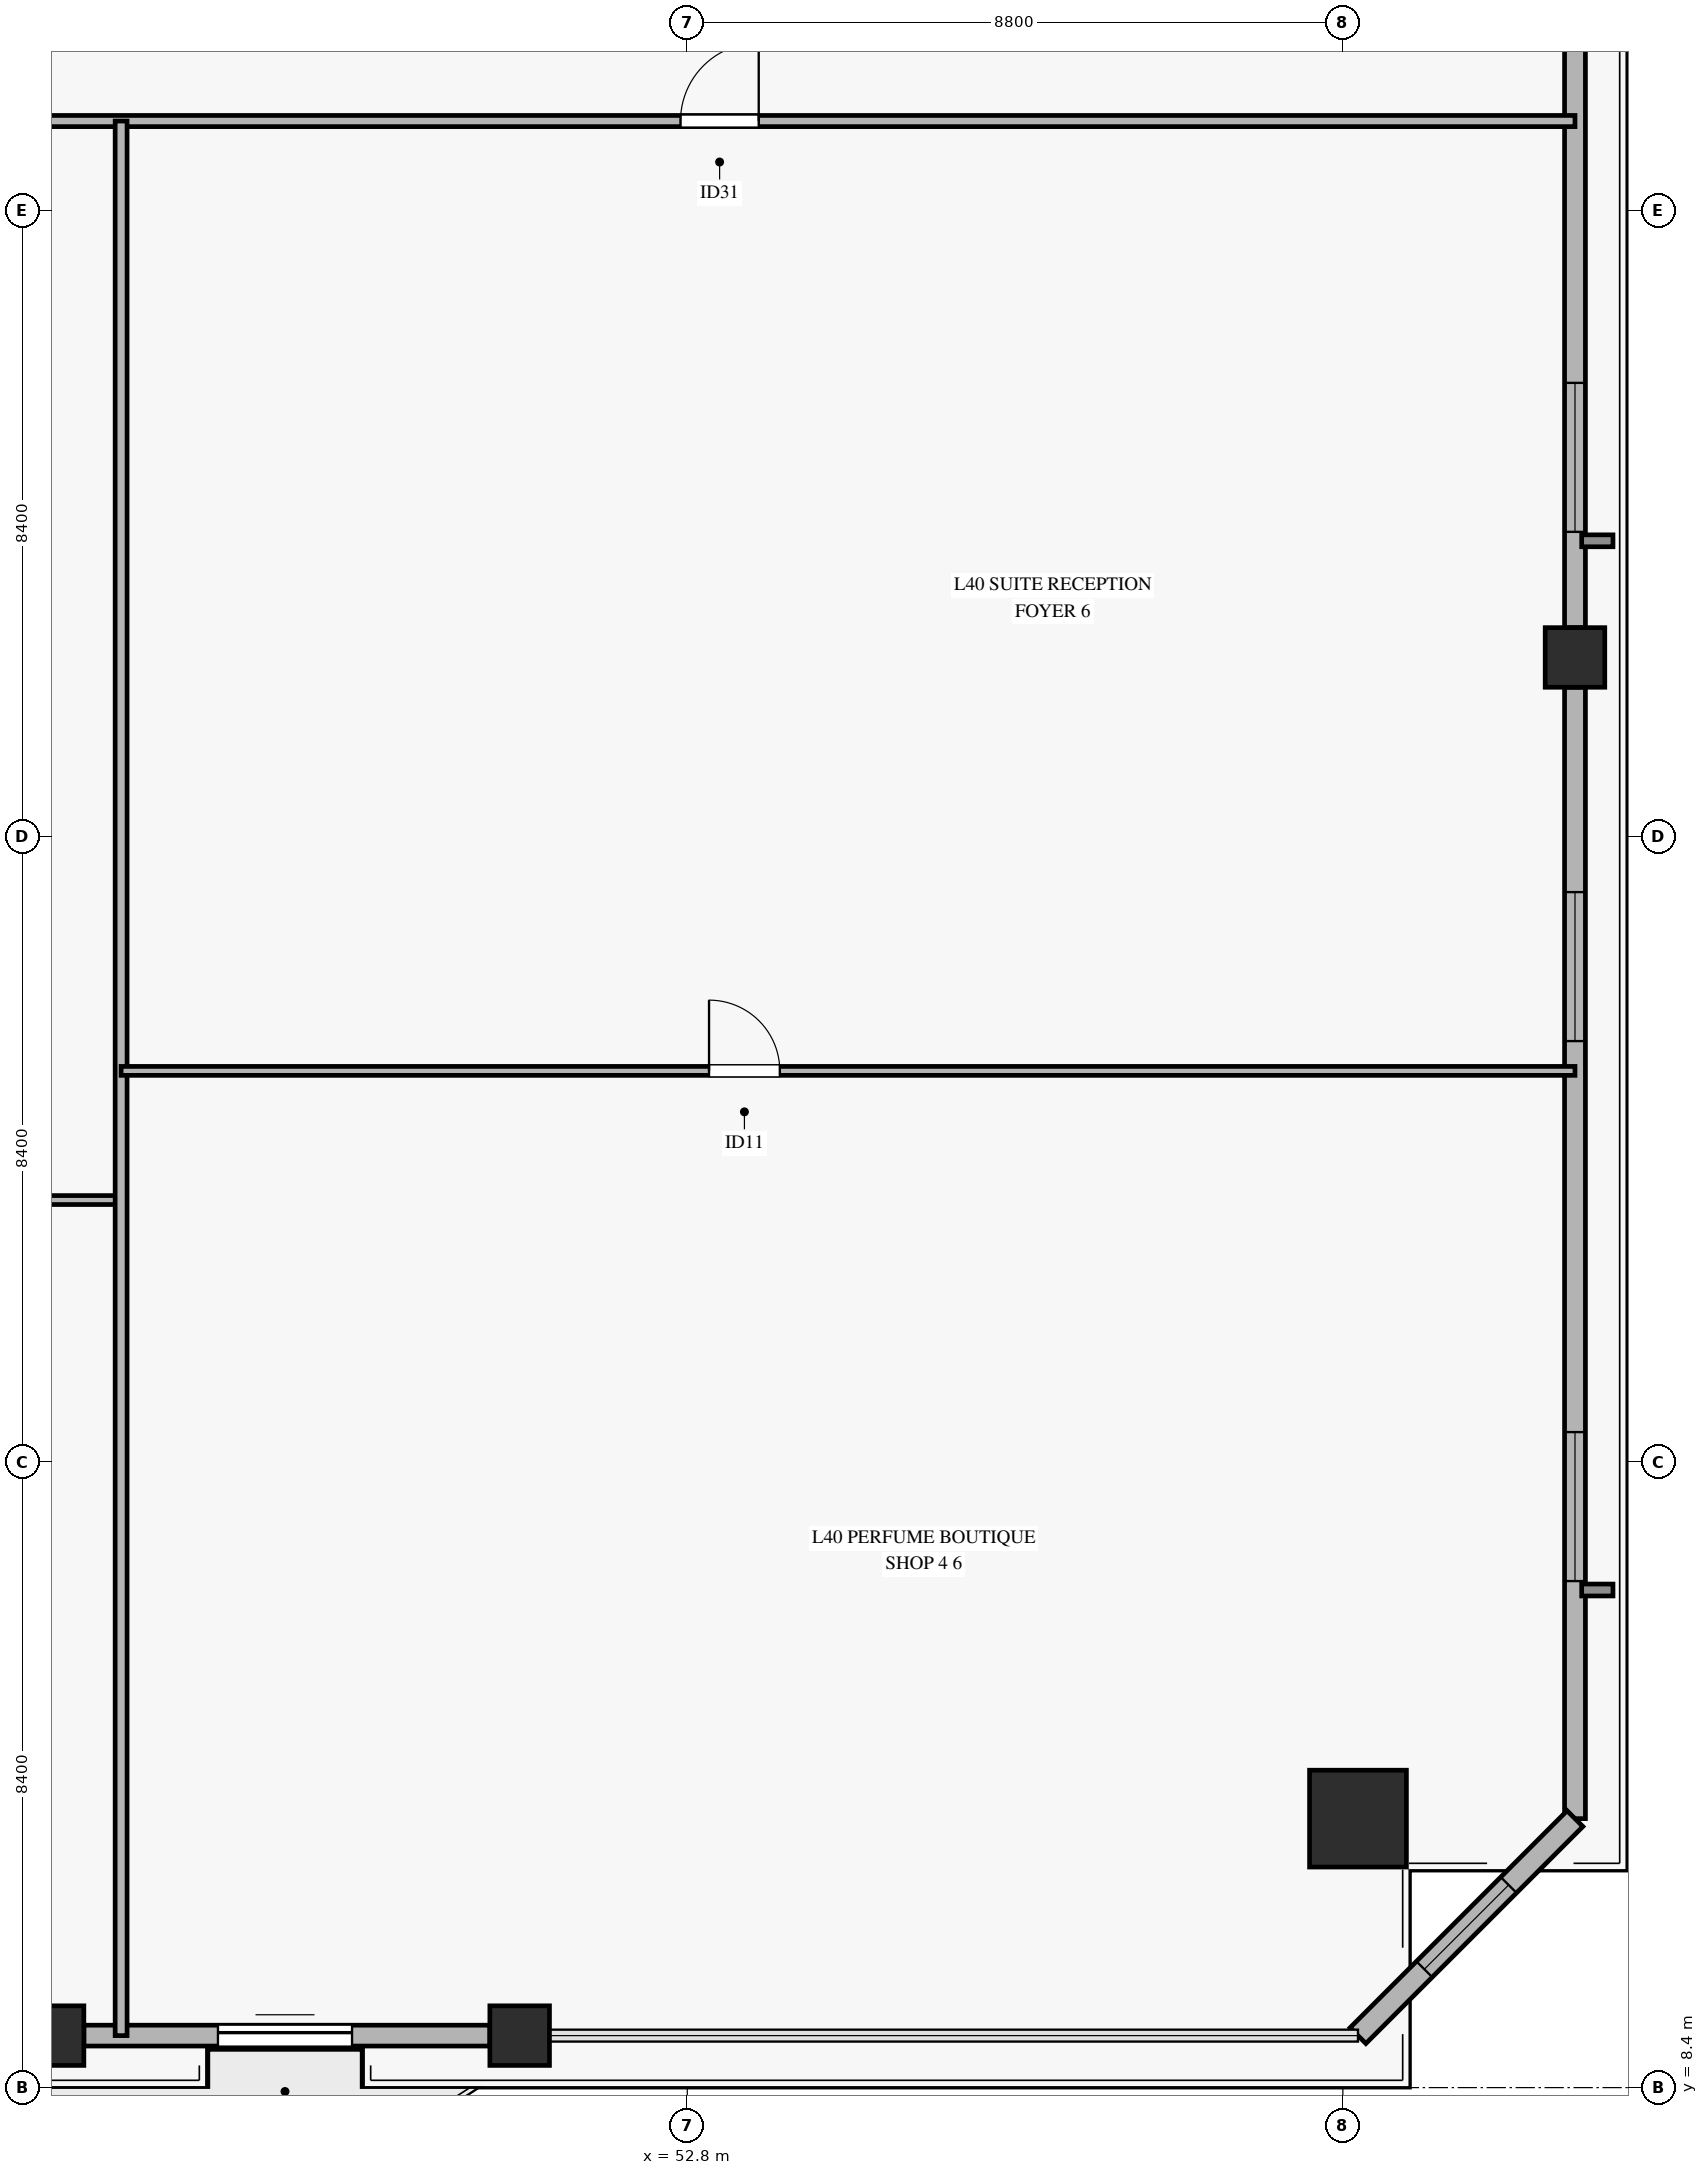
"""IFC4 building model, lengths in metres.
Left out: names, types, materials, properties, quantities, classifications, styles, units other than length and angle.
Written with IfcOpenShell. Run it as: python <this file> out.ifc"""

import sys

from ifc_helpers import new_model, si_unit, direction, frame, frame_2d, origin, origin_2d, place, context, subcontext, project, spatial, rectangle, hollow_rectangle, extrude, source, transform, mapped, element, fill, save


model = new_model("IFC4")
c1 = context("Model", 3, precision=1e-05, world=origin(), true_north=direction((0.0, 1.0)))
c2 = subcontext(c1, "Body", "Model", "MODEL_VIEW")
j1 = project(units=[si_unit("LENGTHUNIT", "METRE"), si_unit("PLANEANGLEUNIT", "RADIAN")], contexts=[c1])
p1 = place(None, origin())
s1 = spatial("IfcSite", under=j1, at=p1, CompositionType="ELEMENT")
p2 = place(p1, origin())
s2 = spatial("IfcBuilding", under=s1, at=p2, CompositionType="ELEMENT")
p3 = place(p2, frame((0.0, 0.0, 163.2)))
s3 = spatial("IfcBuildingStorey", under=s2, at=p3, CompositionType="ELEMENT", Elevation=163.2)
m1 = source(origin(), c2, "Body", "SweptSolid", [
    extrude(hollow_rectangle(XDim=1.3, YDim=1.3, WallThickness=0.06, at=origin_2d()), origin(), (0.0, 0.0, 1.0), 3.27),
])
p4 = place(p3, frame((61.803, 12.011, 0.0), z_axis=(0.0, 0.0, 1.0), x_axis=(1.0, 0.0, 0.0)))
e1 = element("IfcColumn", 1, at=p4, inside=s3, PredefinedType="COLUMN", context=c2, shape_type="MappedRepresentation", body=[
    mapped(m1, transform((0.0, 0.0, 0.0), x_axis=(1.0, 0.0, 0.0), y_axis=(0.0, 1.0, 0.0), z_axis=(0.0, 0.0, 1.0), scale=1.0)),
])
m2 = source(origin(), c2, "Body", "SweptSolid", [
    extrude(hollow_rectangle(XDim=0.8, YDim=0.8, WallThickness=0.036, at=origin_2d()), origin(), (0.0, 0.0, 1.0), 3.27),
])
for number, where, z_axis, x_axis in (
    (2, (44.3, 9.098, 0.0), (0.0, 0.0, 1.0), (1.0, 0.0, 0.0)),
    (3, (50.55, 9.098, 0.0), (0.0, 0.0, 1.0), (1.0, 0.0, 0.0)),
    (4, (64.716, 27.599, 0.0), (0.0, 0.0, 1.0), (1.0, 0.0, 0.0)),
):
    element("IfcColumn", number, at=place(p3, frame(where, z_axis=z_axis, x_axis=x_axis)), inside=s3, PredefinedType="COLUMN", context=c2, shape_type="MappedRepresentation", body=[
        mapped(m2, transform((0.0, 0.0, 0.0), x_axis=(1.0, 0.0, 0.0), y_axis=(0.0, 1.0, 0.0), z_axis=(0.0, 0.0, 1.0), scale=1.0)),
    ])
p5 = place(p3, frame((44.7, 9.098, 0.0), z_axis=(0.0, 0.0, 1.0), x_axis=(1.0, 0.0, 0.0)))
e5 = element("IfcWall", 5, at=p5, inside=s3, PredefinedType="SOLIDWALL", context=c2, shape_type="SweptSolid", body=[
    extrude(rectangle(XDim=5.45, YDim=0.28, at=frame_2d((2.725, 0.0))), origin(), (0.0, 0.0, 1.0), 2.75),
])
p6 = place(p5, frame((1.8, 0.0, 0.0)))
e6 = element("IfcOpeningElement", 6, at=p6, cuts=e5, PredefinedType="OPENING", context=c2, shape_type="SweptSolid", body=[
    extrude(rectangle(XDim=1.8, YDim=2.25, at=frame_2d((0.9, 1.125))), frame((0.0, 0.15, 0.0), z_axis=(0.0, -1.0, 0.0), x_axis=(1.0, 0.0, 0.0)), (0.0, 0.0, 1.0), 0.3),
])
p7 = place(p3, frame((64.716, 12.011, 0.0), z_axis=(0.0, 0.0, 1.0), x_axis=(0.0, 1.0, 0.0)))
e7 = element("IfcWall", 7, at=p7, inside=s3, PredefinedType="SOLIDWALL", context=c2, shape_type="SweptSolid", body=[
    extrude(rectangle(XDim=15.188, YDim=0.28, at=frame_2d((7.594, 0.0))), origin(), (0.0, 0.0, 1.0), 2.75),
])
p8 = place(p7, frame((3.189, 0.0, 0.45)))
e8 = element("IfcOpeningElement", 8, at=p8, cuts=e7, PredefinedType="OPENING", context=c2, shape_type="SweptSolid", body=[
    extrude(rectangle(XDim=2.0, YDim=2.0, at=frame_2d((1.0, 1.0))), frame((0.0, 0.15, 0.0), z_axis=(0.0, -1.0, 0.0), x_axis=(1.0, 0.0, 0.0)), (0.0, 0.0, 1.0), 0.3),
])
p9 = place(p7, frame((10.438, 0.0, 0.45)))
e9 = element("IfcOpeningElement", 9, at=p9, cuts=e7, PredefinedType="OPENING", context=c2, shape_type="SweptSolid", body=[
    extrude(rectangle(XDim=2.0, YDim=2.0, at=frame_2d((1.0, 1.0))), frame((0.0, 0.15, 0.0), z_axis=(0.0, -1.0, 0.0), x_axis=(1.0, 0.0, 0.0)), (0.0, 0.0, 1.0), 0.3),
])
p10 = place(p3, frame((64.716, 27.999, 0.0), z_axis=(0.0, 0.0, 1.0), x_axis=(0.0, 1.0, 0.0)))
e10 = element("IfcWall", 10, at=p10, inside=s3, PredefinedType="SOLIDWALL", context=c2, shape_type="SweptSolid", body=[
    extrude(rectangle(XDim=15.188, YDim=0.28, at=frame_2d((7.594, 0.0))), origin(), (0.0, 0.0, 1.0), 2.75),
])
p11 = place(p10, frame((1.286, 0.0, 0.45)))
e11 = element("IfcOpeningElement", 11, at=p11, cuts=e10, PredefinedType="OPENING", context=c2, shape_type="SweptSolid", body=[
    extrude(rectangle(XDim=2.0, YDim=2.0, at=frame_2d((1.0, 1.0))), frame((0.0, 0.15, 0.0), z_axis=(0.0, -1.0, 0.0), x_axis=(1.0, 0.0, 0.0)), (0.0, 0.0, 1.0), 0.3),
])
p12 = place(p10, frame((11.834, 0.0, 0.45)))
e12 = element("IfcOpeningElement", 12, at=p12, cuts=e10, PredefinedType="OPENING", context=c2, shape_type="SweptSolid", body=[
    extrude(rectangle(XDim=2.0, YDim=2.0, at=frame_2d((1.0, 1.0))), frame((0.0, 0.15, 0.0), z_axis=(0.0, -1.0, 0.0), x_axis=(1.0, 0.0, 0.0)), (0.0, 0.0, 1.0), 0.3),
])
p13 = place(p3, frame((61.803, 9.098, 0.0), z_axis=(0.0, 0.0, 1.0), x_axis=(0.707106781187, 0.707106781187, 0.0)))
e13 = element("IfcWall", 13, at=p13, inside=s3, PredefinedType="SOLIDWALL", context=c2, shape_type="SweptSolid", body=[
    extrude(rectangle(XDim=4.12, YDim=0.3, at=frame_2d((2.06, 0.0))), origin(), (0.0, 0.0, 1.0), 2.75),
])
p14 = place(p13, frame((1.26, 0.0, 0.45)))
e14 = element("IfcOpeningElement", 14, at=p14, cuts=e13, PredefinedType="OPENING", context=c2, shape_type="SweptSolid", body=[
    extrude(rectangle(XDim=1.6, YDim=2.0, at=frame_2d((0.8, 1.0))), frame((0.0, 0.16, 0.0), z_axis=(0.0, -1.0, 0.0), x_axis=(1.0, 0.0, 0.0)), (0.0, 0.0, 1.0), 0.32),
])
p15 = place(p3, frame((5.684, 34.8, 0.0), z_axis=(0.0, 0.0, 1.0), x_axis=(1.0, 0.0, 0.0)))
e15 = element("IfcWall", 15, at=p15, inside=s3, PredefinedType="PARTITIONING", context=c2, shape_type="SweptSolid", body=[
    extrude(rectangle(XDim=59.032, YDim=0.15, at=frame_2d((29.516, 0.0))), origin(), (0.0, 0.0, 1.0), 2.455),
])
p16 = place(p15, frame((6.645, 0.0, 0.0)))
e16 = element("IfcOpeningElement", 16, at=p16, cuts=e15, PredefinedType="OPENING", context=c2, shape_type="SweptSolid", body=[
    extrude(rectangle(XDim=1.05, YDim=2.15, at=frame_2d((0.525, 1.075))), frame((0.0, 0.085, 0.0), z_axis=(0.0, -1.0, 0.0), x_axis=(1.0, 0.0, 0.0)), (0.0, 0.0, 1.0), 0.17),
])
p17 = place(p15, frame((19.241, 0.0, 0.0)))
e17 = element("IfcOpeningElement", 17, at=p17, cuts=e15, PredefinedType="OPENING", context=c2, shape_type="SweptSolid", body=[
    extrude(rectangle(XDim=1.05, YDim=2.15, at=frame_2d((0.525, 1.075))), frame((0.0, 0.085, 0.0), z_axis=(0.0, -1.0, 0.0), x_axis=(1.0, 0.0, 0.0)), (0.0, 0.0, 1.0), 0.17),
])
p18 = place(p15, frame((25.213, 0.0, 0.0)))
e18 = element("IfcOpeningElement", 18, at=p18, cuts=e15, PredefinedType="OPENING", context=c2, shape_type="SweptSolid", body=[
    extrude(rectangle(XDim=1.05, YDim=2.15, at=frame_2d((0.525, 1.075))), frame((0.0, 0.085, 0.0), z_axis=(0.0, -1.0, 0.0), x_axis=(1.0, 0.0, 0.0)), (0.0, 0.0, 1.0), 0.17),
])
p19 = place(p15, frame((31.086, 0.0, 0.0)))
e19 = element("IfcOpeningElement", 19, at=p19, cuts=e15, PredefinedType="OPENING", context=c2, shape_type="SweptSolid", body=[
    extrude(rectangle(XDim=1.05, YDim=2.15, at=frame_2d((0.525, 1.075))), frame((0.0, 0.085, 0.0), z_axis=(0.0, -1.0, 0.0), x_axis=(1.0, 0.0, 0.0)), (0.0, 0.0, 1.0), 0.17),
])
p20 = place(p15, frame((36.632, 0.0, 0.0)))
e20 = element("IfcOpeningElement", 20, at=p20, cuts=e15, PredefinedType="OPENING", context=c2, shape_type="SweptSolid", body=[
    extrude(rectangle(XDim=1.05, YDim=2.15, at=frame_2d((0.525, 1.075))), frame((0.0, 0.085, 0.0), z_axis=(0.0, -1.0, 0.0), x_axis=(1.0, 0.0, 0.0)), (0.0, 0.0, 1.0), 0.17),
])
p21 = place(p15, frame((47.025, 0.0, 0.0)))
e21 = element("IfcOpeningElement", 21, at=p21, cuts=e15, PredefinedType="OPENING", context=c2, shape_type="SweptSolid", body=[
    extrude(rectangle(XDim=1.05, YDim=2.15, at=frame_2d((0.525, 1.075))), frame((0.0, 0.085, 0.0), z_axis=(0.0, -1.0, 0.0), x_axis=(1.0, 0.0, 0.0)), (0.0, 0.0, 1.0), 0.17),
])
p22 = place(p3, frame((39.8, 20.315, 0.0), z_axis=(0.0, 0.0, 1.0), x_axis=(1.0, 0.0, 0.0)))
e22 = element("IfcWall", 22, at=p22, inside=s3, PredefinedType="PARTITIONING", context=c2, shape_type="SweptSolid", body=[
    extrude(rectangle(XDim=5.4, YDim=0.12, at=frame_2d((2.7, 0.0))), origin(), (0.0, 0.0, 1.0), 2.455),
])
p23 = place(p22, frame((2.425, 0.0, 0.0)))
e23 = element("IfcOpeningElement", 23, at=p23, cuts=e22, PredefinedType="OPENING", context=c2, shape_type="SweptSolid", body=[
    extrude(rectangle(XDim=0.95, YDim=2.1, at=frame_2d((0.475, 1.05))), frame((0.0, 0.07, 0.0), z_axis=(0.0, -1.0, 0.0), x_axis=(1.0, 0.0, 0.0)), (0.0, 0.0, 1.0), 0.14),
])
p24 = place(p3, frame((45.2, 9.098, 0.0), z_axis=(0.0, 0.0, 1.0), x_axis=(0.0, 1.0, 0.0)))
e24 = element("IfcWall", 24, at=p24, inside=s3, PredefinedType="PARTITIONING", context=c2, shape_type="SweptSolid", body=[
    extrude(rectangle(XDim=25.702, YDim=0.16, at=frame_2d((12.851, 0.0))), origin(), (0.0, 0.0, 1.0), 2.755),
])
p25 = place(p3, frame((45.2, 22.049, 0.0), z_axis=(0.0, 0.0, 1.0), x_axis=(1.0, 0.0, 0.0)))
e25 = element("IfcWall", 25, at=p25, inside=s3, PredefinedType="PARTITIONING", context=c2, shape_type="SweptSolid", body=[
    extrude(rectangle(XDim=19.516, YDim=0.12, at=frame_2d((9.758, 0.0))), origin(), (0.0, 0.0, 1.0), 2.455),
])
p26 = place(p25, frame((7.892, 0.0, 0.0)))
e26 = element("IfcOpeningElement", 26, at=p26, cuts=e25, PredefinedType="OPENING", context=c2, shape_type="SweptSolid", body=[
    extrude(rectangle(XDim=0.95, YDim=2.1, at=frame_2d((0.475, 1.05))), frame((0.0, 0.07, 0.0), z_axis=(0.0, -1.0, 0.0), x_axis=(1.0, 0.0, 0.0)), (0.0, 0.0, 1.0), 0.14),
])
m3 = source(origin(), c2, "Body", "SweptSolid", [
    extrude(rectangle(XDim=1.8, YDim=2.25, at=frame_2d((0.9, 1.125))), frame((0.0, 0.025, 0.0), z_axis=(0.0, -1.0, 0.0), x_axis=(1.0, 0.0, 0.0)), (0.0, 0.0, 1.0), 0.05),
])
p27 = place(p6, origin())
e27 = element("IfcDoor", 27, at=p27, inside=s3, OperationType="SLIDING_TO_LEFT", PredefinedType="DOOR", context=c2, shape_type="MappedRepresentation", body=[
    mapped(m3, transform((0.0, 0.0, 0.0), x_axis=(1.0, 0.0, 0.0), y_axis=(0.0, 1.0, 0.0), z_axis=(0.0, 0.0, 1.0), scale=1.0)),
])
fill(e6, e27)
m4 = source(origin(), c2, "Body", "SweptSolid", [
    extrude(rectangle(XDim=2.0, YDim=2.0, at=frame_2d((1.0, 1.0))), frame((0.0, 0.03, 0.0), z_axis=(0.0, -1.0, 0.0), x_axis=(1.0, 0.0, 0.0)), (0.0, 0.0, 1.0), 0.06),
])
p28 = place(p8, origin())
e28 = element("IfcWindow", 28, at=p28, inside=s3, PartitioningType="SINGLE_PANEL", PredefinedType="WINDOW", context=c2, shape_type="MappedRepresentation", body=[
    mapped(m4, transform((0.0, 0.0, 0.0), x_axis=(1.0, 0.0, 0.0), y_axis=(0.0, 1.0, 0.0), z_axis=(0.0, 0.0, 1.0), scale=1.0)),
])
fill(e8, e28)
p29 = place(p9, origin())
e29 = element("IfcWindow", 29, at=p29, inside=s3, PartitioningType="SINGLE_PANEL", PredefinedType="WINDOW", context=c2, shape_type="MappedRepresentation", body=[
    mapped(m4, transform((0.0, 0.0, 0.0), x_axis=(1.0, 0.0, 0.0), y_axis=(0.0, 1.0, 0.0), z_axis=(0.0, 0.0, 1.0), scale=1.0)),
])
fill(e9, e29)
p30 = place(p11, origin())
e30 = element("IfcWindow", 30, at=p30, inside=s3, PartitioningType="SINGLE_PANEL", PredefinedType="WINDOW", context=c2, shape_type="MappedRepresentation", body=[
    mapped(m4, transform((0.0, 0.0, 0.0), x_axis=(1.0, 0.0, 0.0), y_axis=(0.0, 1.0, 0.0), z_axis=(0.0, 0.0, 1.0), scale=1.0)),
])
fill(e11, e30)
m5 = source(origin(), c2, "Body", "SweptSolid", [
    extrude(rectangle(XDim=1.6, YDim=2.0, at=frame_2d((0.8, 1.0))), frame((0.0, 0.03, 0.0), z_axis=(0.0, -1.0, 0.0), x_axis=(1.0, 0.0, 0.0)), (0.0, 0.0, 1.0), 0.06),
])
p31 = place(p14, origin())
e31 = element("IfcWindow", 31, at=p31, inside=s3, PartitioningType="SINGLE_PANEL", PredefinedType="WINDOW", context=c2, shape_type="MappedRepresentation", body=[
    mapped(m5, transform((0.0, 0.0, 0.0), x_axis=(1.0, 0.0, 0.0), y_axis=(0.0, 1.0, 0.0), z_axis=(0.0, 0.0, 1.0), scale=1.0)),
])
fill(e14, e31)
m6 = source(origin(), c2, "Body", "SweptSolid", [
    extrude(rectangle(XDim=1.05, YDim=2.15, at=frame_2d((0.525, 1.075))), frame((0.0, 0.025, 0.0), z_axis=(0.0, -1.0, 0.0), x_axis=(1.0, 0.0, 0.0)), (0.0, 0.0, 1.0), 0.05),
])
p32 = place(p21, origin())
e32 = element("IfcDoor", 32, at=p32, inside=s3, OperationType="SINGLE_SWING_RIGHT", PredefinedType="DOOR", context=c2, shape_type="MappedRepresentation", body=[
    mapped(m6, transform((0.0, 0.0, 0.0), x_axis=(1.0, 0.0, 0.0), y_axis=(0.0, 1.0, 0.0), z_axis=(0.0, 0.0, 1.0), scale=1.0)),
])
fill(e21, e32)
m7 = source(origin(), c2, "Body", "SweptSolid", [
    extrude(rectangle(XDim=0.95, YDim=2.1, at=frame_2d((0.475, 1.05))), frame((0.0, 0.025, 0.0), z_axis=(0.0, -1.0, 0.0), x_axis=(1.0, 0.0, 0.0)), (0.0, 0.0, 1.0), 0.05),
])
p33 = place(p26, origin())
e33 = element("IfcDoor", 33, at=p33, inside=s3, OperationType="SINGLE_SWING_LEFT", PredefinedType="DOOR", context=c2, shape_type="MappedRepresentation", body=[
    mapped(m7, transform((0.0, 0.0, 0.0), x_axis=(1.0, 0.0, 0.0), y_axis=(0.0, 1.0, 0.0), z_axis=(0.0, 0.0, 1.0), scale=1.0)),
])
fill(e26, e33)
save(model, sys.argv[1])
